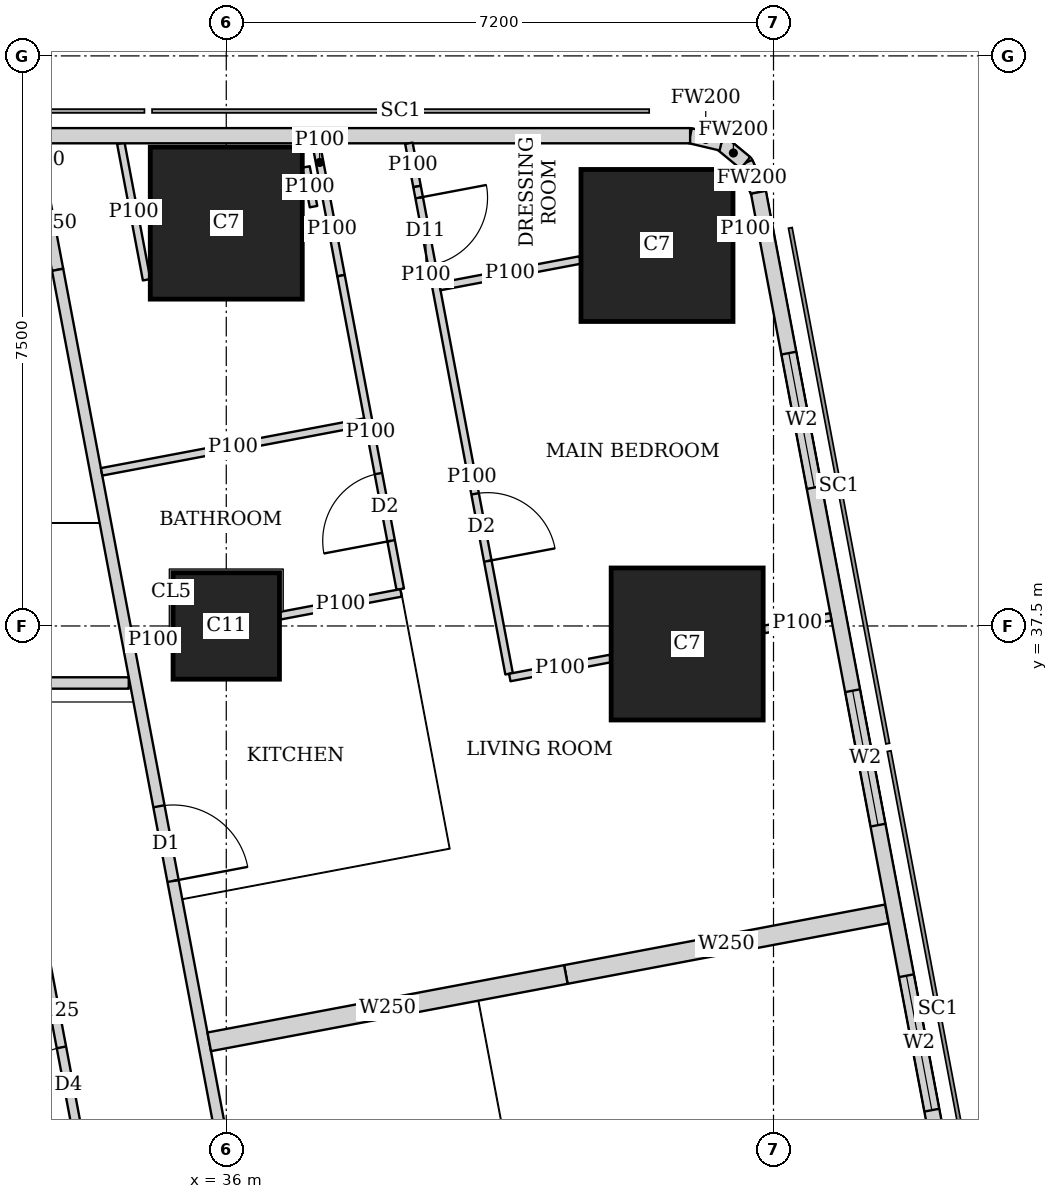
"""IFC4 building model, lengths in metres.
Left out: names, types, materials, properties, quantities, classifications, styles, units other than length and angle.
Written with IfcOpenShell. Run it as: python <this file> out.ifc"""

import sys

from ifc_helpers import new_model, si_unit, direction, frame, frame_2d, origin, origin_2d, place, context, subcontext, project, spatial, rectangle, extrude, element, fill, save


model = new_model("IFC4")
c1 = context("Model", 3, precision=1e-05, world=origin(), true_north=direction((0.0, 1.0)))
c2 = subcontext(c1, "Body", "Model", "MODEL_VIEW")
j1 = project(units=[si_unit("LENGTHUNIT", "METRE"), si_unit("PLANEANGLEUNIT", "RADIAN")], contexts=[c1])
p1 = place(None, origin())
s1 = spatial("IfcSite", under=j1, at=p1, CompositionType="ELEMENT")
p2 = place(p1, origin())
s2 = spatial("IfcBuilding", under=s1, at=p2, CompositionType="ELEMENT")
p3 = place(p2, frame((0.0, 0.0, 255.35)))
s3 = spatial("IfcBuildingStorey", under=s2, at=p3, CompositionType="ELEMENT", Elevation=255.35)
p4 = place(p3, frame((36.0, 37.5, 0.0), z_axis=(0.0, 0.0, 1.0), x_axis=(1.0, 0.0, 0.0)))
e1 = element("IfcColumn", 1, at=p4, inside=s3, PredefinedType="COLUMN", context=c2, shape_type="SweptSolid", body=[
    extrude(rectangle(XDim=1.4, YDim=1.4, at=origin_2d()), origin(), (0.0, 0.0, 1.0), 3.75),
])
for number, where, z_axis, x_axis in (
    (2, (42.064, 37.263, 0.0), (0.0, 0.0, 1.0), (1.0, 0.0, 0.0)),
    (3, (36.0, 42.8, 0.0), (0.0, 0.0, 1.0), (1.0, 0.0, 0.0)),
    (4, (41.667, 42.506, 0.0), (0.0, 0.0, 1.0), (1.0, 0.0, 0.0)),
):
    element("IfcColumn", number, at=place(p3, frame(where, z_axis=z_axis, x_axis=x_axis)), inside=s3, PredefinedType="COLUMN", context=c2, shape_type="SweptSolid", body=[
        extrude(rectangle(XDim=2.0, YDim=2.0, at=origin_2d()), origin(), (0.0, 0.0, 1.0), 3.75),
    ])
p5 = place(p3, frame((49.684, 7.832, 0.0), z_axis=(0.0, 0.0, 1.0), x_axis=(-0.185616669694, 0.982622232565, 0.0)))
e5 = element("IfcWall", 5, at=p5, inside=s3, PredefinedType="SOLIDWALL", context=c2, shape_type="SweptSolid", body=[
    extrude(rectangle(XDim=36.0, YDim=0.2, at=frame_2d((18.0, 0.0))), origin(), (0.0, 0.0, 1.0), 3.5),
])
p6 = place(p5, frame((2.518, 0.0, 0.9)))
e6 = element("IfcOpeningElement", 6, at=p6, cuts=e5, PredefinedType="OPENING", context=c2, shape_type="SweptSolid", body=[
    extrude(rectangle(XDim=2.4, YDim=1.5, at=frame_2d((1.2, 0.75))), frame((0.0, 0.11, 0.0), z_axis=(0.0, -1.0, 0.0), x_axis=(1.0, 0.0, 0.0)), (0.0, 0.0, 1.0), 0.22),
])
p7 = place(p5, frame((8.444, 0.0, 0.9)))
e7 = element("IfcOpeningElement", 7, at=p7, cuts=e5, PredefinedType="OPENING", context=c2, shape_type="SweptSolid", body=[
    extrude(rectangle(XDim=1.8, YDim=1.5, at=frame_2d((0.9, 0.75))), frame((0.0, 0.11, 0.0), z_axis=(0.0, -1.0, 0.0), x_axis=(1.0, 0.0, 0.0)), (0.0, 0.0, 1.0), 0.22),
])
p8 = place(p5, frame((12.261, 0.0, 0.9)))
e8 = element("IfcOpeningElement", 8, at=p8, cuts=e5, PredefinedType="OPENING", context=c2, shape_type="SweptSolid", body=[
    extrude(rectangle(XDim=1.8, YDim=1.5, at=frame_2d((0.9, 0.75))), frame((0.0, 0.11, 0.0), z_axis=(0.0, -1.0, 0.0), x_axis=(1.0, 0.0, 0.0)), (0.0, 0.0, 1.0), 0.22),
])
p9 = place(p5, frame((16.078, 0.0, 0.9)))
e9 = element("IfcOpeningElement", 9, at=p9, cuts=e5, PredefinedType="OPENING", context=c2, shape_type="SweptSolid", body=[
    extrude(rectangle(XDim=1.8, YDim=1.5, at=frame_2d((0.9, 0.75))), frame((0.0, 0.11, 0.0), z_axis=(0.0, -1.0, 0.0), x_axis=(1.0, 0.0, 0.0)), (0.0, 0.0, 1.0), 0.22),
])
p10 = place(p5, frame((19.894, 0.0, 0.9)))
e10 = element("IfcOpeningElement", 10, at=p10, cuts=e5, PredefinedType="OPENING", context=c2, shape_type="SweptSolid", body=[
    extrude(rectangle(XDim=1.8, YDim=1.5, at=frame_2d((0.9, 0.75))), frame((0.0, 0.11, 0.0), z_axis=(0.0, -1.0, 0.0), x_axis=(1.0, 0.0, 0.0)), (0.0, 0.0, 1.0), 0.22),
])
p11 = place(p5, frame((23.71, 0.0, 0.9)))
e11 = element("IfcOpeningElement", 11, at=p11, cuts=e5, PredefinedType="OPENING", context=c2, shape_type="SweptSolid", body=[
    extrude(rectangle(XDim=1.8, YDim=1.5, at=frame_2d((0.9, 0.75))), frame((0.0, 0.11, 0.0), z_axis=(0.0, -1.0, 0.0), x_axis=(1.0, 0.0, 0.0)), (0.0, 0.0, 1.0), 0.22),
])
p12 = place(p5, frame((27.526, 0.0, 0.9)))
e12 = element("IfcOpeningElement", 12, at=p12, cuts=e5, PredefinedType="OPENING", context=c2, shape_type="SweptSolid", body=[
    extrude(rectangle(XDim=1.8, YDim=1.5, at=frame_2d((0.9, 0.75))), frame((0.0, 0.11, 0.0), z_axis=(0.0, -1.0, 0.0), x_axis=(1.0, 0.0, 0.0)), (0.0, 0.0, 1.0), 0.22),
])
p13 = place(p5, frame((32.046, 0.0, 0.9)))
e13 = element("IfcOpeningElement", 13, at=p13, cuts=e5, PredefinedType="OPENING", context=c2, shape_type="SweptSolid", body=[
    extrude(rectangle(XDim=1.8, YDim=1.5, at=frame_2d((0.9, 0.75))), frame((0.0, 0.11, 0.0), z_axis=(0.0, -1.0, 0.0), x_axis=(1.0, 0.0, 0.0)), (0.0, 0.0, 1.0), 0.22),
])
p14 = place(p3, frame((43.002, 43.206, 0.0), z_axis=(0.0, 0.0, 1.0), x_axis=(-0.40678170573, 0.913525393124, 0.0)))
e14 = element("IfcWall", 14, at=p14, inside=s3, PredefinedType="SOLIDWALL", context=c2, shape_type="SweptSolid", body=[
    extrude(rectangle(XDim=0.423, YDim=0.2, at=frame_2d((0.211, 0.0))), origin(), (0.0, 0.0, 1.0), 3.5),
])
p15 = place(p3, frame((42.83, 43.592, 0.0), z_axis=(0.0, 0.0, 1.0), x_axis=(-0.771190539797, 0.636604391539, 0.0)))
e15 = element("IfcWall", 15, at=p15, inside=s3, PredefinedType="SOLIDWALL", context=c2, shape_type="SweptSolid", body=[
    extrude(rectangle(XDim=0.41, YDim=0.2, at=frame_2d((0.205, 0.0))), origin(), (0.0, 0.0, 1.0), 3.5),
])
p16 = place(p3, frame((42.514, 43.853, 0.0), z_axis=(0.0, 0.0, 1.0), x_axis=(-0.973288080424, 0.229587265555, 0.0)))
e16 = element("IfcWall", 16, at=p16, inside=s3, PredefinedType="SOLIDWALL", context=c2, shape_type="SweptSolid", body=[
    extrude(rectangle(XDim=0.422, YDim=0.2, at=frame_2d((0.211, 0.0))), origin(), (0.0, 0.0, 1.0), 3.5),
])
p17 = place(p3, frame((42.103, 43.95, 0.0), z_axis=(0.0, 0.0, 1.0), x_axis=(-1.0, 0.0, 0.0)))
e17 = element("IfcWall", 17, at=p17, inside=s3, PredefinedType="SOLIDWALL", context=c2, shape_type="SweptSolid", body=[
    extrude(rectangle(XDim=27.54, YDim=0.2, at=frame_2d((13.77, 0.0))), origin(), (0.0, 0.0, 1.0), 3.5),
])
p18 = place(p17, frame((10.603, 0.0, 0.9)))
e18 = element("IfcOpeningElement", 18, at=p18, cuts=e17, PredefinedType="OPENING", context=c2, shape_type="SweptSolid", body=[
    extrude(rectangle(XDim=1.8, YDim=1.5, at=frame_2d((0.9, 0.75))), frame((0.0, 0.11, 0.0), z_axis=(0.0, -1.0, 0.0), x_axis=(1.0, 0.0, 0.0)), (0.0, 0.0, 1.0), 0.22),
])
p19 = place(p17, frame((14.203, 0.0, 0.9)))
e19 = element("IfcOpeningElement", 19, at=p19, cuts=e17, PredefinedType="OPENING", context=c2, shape_type="SweptSolid", body=[
    extrude(rectangle(XDim=1.8, YDim=1.5, at=frame_2d((0.9, 0.75))), frame((0.0, 0.11, 0.0), z_axis=(0.0, -1.0, 0.0), x_axis=(1.0, 0.0, 0.0)), (0.0, 0.0, 1.0), 0.22),
])
p20 = place(p17, frame((17.803, 0.0, 0.9)))
e20 = element("IfcOpeningElement", 20, at=p20, cuts=e17, PredefinedType="OPENING", context=c2, shape_type="SweptSolid", body=[
    extrude(rectangle(XDim=1.8, YDim=1.5, at=frame_2d((0.9, 0.75))), frame((0.0, 0.11, 0.0), z_axis=(0.0, -1.0, 0.0), x_axis=(1.0, 0.0, 0.0)), (0.0, 0.0, 1.0), 0.22),
])
p21 = place(p17, frame((22.822, 0.0, 0.9)))
e21 = element("IfcOpeningElement", 21, at=p21, cuts=e17, PredefinedType="OPENING", context=c2, shape_type="SweptSolid", body=[
    extrude(rectangle(XDim=2.4, YDim=1.5, at=frame_2d((1.2, 0.75))), frame((0.0, 0.11, 0.0), z_axis=(0.0, -1.0, 0.0), x_axis=(1.0, 0.0, 0.0)), (0.0, 0.0, 1.0), 0.22),
])
p22 = place(p3, frame((29.501, 36.75, 0.0), z_axis=(0.0, 0.0, 1.0), x_axis=(1.0, 0.0, 0.0)))
e22 = element("IfcWall", 22, at=p22, inside=s3, PredefinedType="SOLIDWALL", context=c2, shape_type="SweptSolid", body=[
    extrude(rectangle(XDim=5.216, YDim=0.15, at=frame_2d((2.608, 0.0))), origin(), (0.0, 0.0, 1.0), 3.5),
])
p23 = place(p22, frame((1.803, 0.0, 0.0)))
e23 = element("IfcOpeningElement", 23, at=p23, cuts=e22, PredefinedType="OPENING", context=c2, shape_type="SweptSolid", body=[
    extrude(rectangle(XDim=1.0, YDim=2.1, at=frame_2d((0.5, 1.05))), frame((0.0, 0.085, 0.0), z_axis=(0.0, -1.0, 0.0), x_axis=(1.0, 0.0, 0.0)), (0.0, 0.0, 1.0), 0.17),
])
p24 = place(p3, frame((33.549, 43.414, 0.0), z_axis=(0.0, 0.0, 1.0), x_axis=(0.185585816539, -0.982628060204, 0.0)))
e24 = element("IfcWall", 24, at=p24, inside=s3, PredefinedType="SOLIDWALL", context=c2, shape_type="SweptSolid", body=[
    extrude(rectangle(XDim=1.25, YDim=0.15, at=frame_2d((0.625, 0.0))), origin(), (0.0, 0.0, 1.0), 2.05),
])
p25 = place(p3, frame((33.781, 42.186, 0.0), z_axis=(0.0, 0.0, 1.0), x_axis=(0.185593518645, -0.9826266055, 0.0)))
e25 = element("IfcWall", 25, at=p25, inside=s3, PredefinedType="SOLIDWALL", context=c2, shape_type="SweptSolid", body=[
    extrude(rectangle(XDim=35.961, YDim=0.15, at=frame_2d((17.98, 0.0))), origin(), (0.0, 0.0, 1.0), 2.5),
])
p26 = place(p25, frame((7.183, 0.0, 0.0)))
e26 = element("IfcOpeningElement", 26, at=p26, cuts=e25, PredefinedType="OPENING", context=c2, shape_type="SweptSolid", body=[
    extrude(rectangle(XDim=1.0, YDim=2.1, at=frame_2d((0.5, 1.05))), frame((0.0, 0.085, 0.0), z_axis=(0.0, -1.0, 0.0), x_axis=(1.0, 0.0, 0.0)), (0.0, 0.0, 1.0), 0.17),
])
p27 = place(p25, frame((11.76, 0.0, 0.0)))
e27 = element("IfcOpeningElement", 27, at=p27, cuts=e25, PredefinedType="OPENING", context=c2, shape_type="SweptSolid", body=[
    extrude(rectangle(XDim=1.0, YDim=2.1, at=frame_2d((0.5, 1.05))), frame((0.0, 0.085, 0.0), z_axis=(0.0, -1.0, 0.0), x_axis=(1.0, 0.0, 0.0)), (0.0, 0.0, 1.0), 0.17),
])
p28 = place(p25, frame((23.863, 0.0, 0.0)))
e28 = element("IfcOpeningElement", 28, at=p28, cuts=e25, PredefinedType="OPENING", context=c2, shape_type="SweptSolid", body=[
    extrude(rectangle(XDim=1.0, YDim=2.1, at=frame_2d((0.5, 1.05))), frame((0.0, 0.085, 0.0), z_axis=(0.0, -1.0, 0.0), x_axis=(1.0, 0.0, 0.0)), (0.0, 0.0, 1.0), 0.17),
])
p29 = place(p25, frame((30.502, 0.0, 0.0)))
e29 = element("IfcOpeningElement", 29, at=p29, cuts=e25, PredefinedType="OPENING", context=c2, shape_type="SweptSolid", body=[
    extrude(rectangle(XDim=1.0, YDim=2.1, at=frame_2d((0.5, 1.05))), frame((0.0, 0.085, 0.0), z_axis=(0.0, -1.0, 0.0), x_axis=(1.0, 0.0, 0.0)), (0.0, 0.0, 1.0), 0.17),
])
p30 = place(p3, frame((34.952, 42.055, 0.0), z_axis=(0.0, 0.0, 1.0), x_axis=(-0.185490642006, 0.98264603074, 0.0)))
e30 = element("IfcWall", 30, at=p30, inside=s3, PredefinedType="PARTITIONING", context=c2, shape_type="SweptSolid", body=[
    extrude(rectangle(XDim=1.827, YDim=0.1, at=frame_2d((0.914, 0.0))), origin(), (0.0, 0.0, 1.0), 2.05),
])
p31 = place(p3, frame((37.049, 43.539, 0.0), z_axis=(0.0, 0.0, 1.0), x_axis=(0.186119495745, -0.982527115811, 0.0)))
e31 = element("IfcWall", 31, at=p31, inside=s3, PredefinedType="PARTITIONING", context=c2, shape_type="SweptSolid", body=[
    extrude(rectangle(XDim=0.531, YDim=0.1, at=frame_2d((0.266, 0.0))), origin(), (0.0, 0.0, 1.0), 2.05),
])
p32 = place(p3, frame((38.403, 43.85, 0.0), z_axis=(0.0, 0.0, 1.0), x_axis=(0.184976954078, -0.982742858768, 0.0)))
e32 = element("IfcWall", 32, at=p32, inside=s3, PredefinedType="PARTITIONING", context=c2, shape_type="SweptSolid", body=[
    extrude(rectangle(XDim=0.578, YDim=0.1, at=frame_2d((0.289, 0.0))), origin(), (0.0, 0.0, 1.0), 3.5),
])
p33 = place(p3, frame((38.51, 43.282, 0.0), z_axis=(0.0, 0.0, 1.0), x_axis=(0.185775287495, -0.982592256511, 0.0)))
e33 = element("IfcWall", 33, at=p33, inside=s3, PredefinedType="PARTITIONING", context=c2, shape_type="SweptSolid", body=[
    extrude(rectangle(XDim=1.259, YDim=0.1, at=frame_2d((0.629, 0.0))), origin(), (0.0, 0.0, 1.0), 2.05),
])
p34 = place(p33, frame((0.15, 0.0, 0.0)))
e34 = element("IfcOpeningElement", 34, at=p34, cuts=e33, PredefinedType="OPENING", context=c2, shape_type="SweptSolid", body=[
    extrude(rectangle(XDim=0.9, YDim=2.0, at=frame_2d((0.45, 1.0))), frame((0.0, 0.06, 0.0), z_axis=(0.0, -1.0, 0.0), x_axis=(1.0, 0.0, 0.0)), (0.0, 0.0, 1.0), 0.12),
])
p35 = place(p3, frame((38.744, 42.045, 0.0), z_axis=(0.0, 0.0, 1.0), x_axis=(0.185564988614, -0.982631993679, 0.0)))
e35 = element("IfcWall", 35, at=p35, inside=s3, PredefinedType="PARTITIONING", context=c2, shape_type="SweptSolid", body=[
    extrude(rectangle(XDim=5.265, YDim=0.1, at=frame_2d((2.633, 0.0))), origin(), (0.0, 0.0, 1.0), 3.5),
])
p36 = place(p35, frame((2.856, 0.0, 0.0)))
e36 = element("IfcOpeningElement", 36, at=p36, cuts=e35, PredefinedType="OPENING", context=c2, shape_type="SweptSolid", body=[
    extrude(rectangle(XDim=0.9, YDim=2.1, at=frame_2d((0.45, 1.05))), frame((0.0, 0.06, 0.0), z_axis=(0.0, -1.0, 0.0), x_axis=(1.0, 0.0, 0.0)), (0.0, 0.0, 1.0), 0.12),
])
p37 = place(p3, frame((37.181, 43.85, 0.0), z_axis=(0.0, 0.0, 1.0), x_axis=(0.185121727606, -0.982715597703, 0.0)))
e37 = element("IfcWall", 37, at=p37, inside=s3, PredefinedType="PARTITIONING", context=c2, shape_type="SweptSolid", body=[
    extrude(rectangle(XDim=0.513, YDim=0.1, at=frame_2d((0.256, 0.0))), origin(), (0.0, 0.0, 1.0), 3.5),
])
p38 = place(p3, frame((37.276, 43.346, 0.0), z_axis=(0.0, 0.0, 1.0), x_axis=(0.185962504646, -0.982556841544, 0.0)))
e38 = element("IfcWall", 38, at=p38, inside=s3, PredefinedType="PARTITIONING", context=c2, shape_type="SweptSolid", body=[
    extrude(rectangle(XDim=1.259, YDim=0.1, at=frame_2d((0.629, 0.0))), origin(), (0.0, 0.0, 1.0), 2.05),
])
p39 = place(p3, frame((37.51, 42.109, 0.0), z_axis=(0.0, 0.0, 1.0), x_axis=(0.185580569503, -0.98262905118, 0.0)))
e39 = element("IfcWall", 39, at=p39, inside=s3, PredefinedType="PARTITIONING", context=c2, shape_type="SweptSolid", body=[
    extrude(rectangle(XDim=4.198, YDim=0.1, at=frame_2d((2.099, 0.0))), origin(), (0.0, 0.0, 1.0), 3.5),
])
p40 = place(p39, frame((2.65, 0.0, 0.0)))
e40 = element("IfcOpeningElement", 40, at=p40, cuts=e39, PredefinedType="OPENING", context=c2, shape_type="SweptSolid", body=[
    extrude(rectangle(XDim=0.9, YDim=2.1, at=frame_2d((0.45, 1.05))), frame((0.0, 0.06, 0.0), z_axis=(0.0, -1.0, 0.0), x_axis=(1.0, 0.0, 0.0)), (0.0, 0.0, 1.0), 0.12),
])
p41 = place(p3, frame((42.985, 42.755, 0.0), z_axis=(0.0, 0.0, 1.0), x_axis=(-0.98281924824, -0.184570651215, 0.0)))
e41 = element("IfcWall", 41, at=p41, inside=s3, PredefinedType="PARTITIONING", context=c2, shape_type="SweptSolid", body=[
    extrude(rectangle(XDim=0.313, YDim=0.1, at=frame_2d((0.157, 0.0))), origin(), (0.0, 0.0, 1.0), 3.5),
])
p42 = place(p3, frame((40.657, 42.315, 0.0), z_axis=(0.0, 0.0, 1.0), x_axis=(-0.982622785543, -0.185613742305, 0.0)))
e42 = element("IfcWall", 42, at=p42, inside=s3, PredefinedType="PARTITIONING", context=c2, shape_type="SweptSolid", body=[
    extrude(rectangle(XDim=1.88, YDim=0.1, at=frame_2d((0.94, 0.0))), origin(), (0.0, 0.0, 1.0), 2.05),
])
p43 = place(p3, frame((43.955, 37.62, 0.0), z_axis=(0.0, 0.0, 1.0), x_axis=(-0.982708424405, -0.18515980288, 0.0)))
e43 = element("IfcWall", 43, at=p43, inside=s3, PredefinedType="PARTITIONING", context=c2, shape_type="SweptSolid", body=[
    extrude(rectangle(XDim=0.897, YDim=0.1, at=frame_2d((0.448, 0.0))), origin(), (0.0, 0.0, 1.0), 3.5),
])
p44 = place(p3, frame((41.054, 37.072, 0.0), z_axis=(0.0, 0.0, 1.0), x_axis=(-0.982635482721, -0.18554651195, 0.0)))
e44 = element("IfcWall", 44, at=p44, inside=s3, PredefinedType="PARTITIONING", context=c2, shape_type="SweptSolid", body=[
    extrude(rectangle(XDim=1.347, YDim=0.1, at=frame_2d((0.674, 0.0))), origin(), (0.0, 0.0, 1.0), 3.5),
])
p45 = place(p3, frame((37.823, 40.182, 0.0), z_axis=(0.0, 0.0, 1.0), x_axis=(-0.98263926043, -0.185526504472, 0.0)))
e45 = element("IfcWall", 45, at=p45, inside=s3, PredefinedType="PARTITIONING", context=c2, shape_type="SweptSolid", body=[
    extrude(rectangle(XDim=3.524, YDim=0.1, at=frame_2d((1.762, 0.0))), origin(), (0.0, 0.0, 1.0), 3.5),
])
p46 = place(p3, frame((38.299, 37.935, 0.0), z_axis=(0.0, 0.0, 1.0), x_axis=(-0.98263725405, -0.185537130931, 0.0)))
e46 = element("IfcWall", 46, at=p46, inside=s3, PredefinedType="PARTITIONING", context=c2, shape_type="SweptSolid", body=[
    extrude(rectangle(XDim=1.617, YDim=0.1, at=frame_2d((0.809, 0.0))), origin(), (0.0, 0.0, 1.0), 3.5),
])
p47 = place(p3, frame((35.29, 37.366, 0.0), z_axis=(0.0, 0.0, 1.0), x_axis=(-0.982715597703, -0.185121727606, 0.0)))
e47 = element("IfcWall", 47, at=p47, inside=s3, PredefinedType="PARTITIONING", context=c2, shape_type="SweptSolid", body=[
    extrude(rectangle(XDim=0.513, YDim=0.1, at=frame_2d((0.256, 0.0))), origin(), (0.0, 0.0, 1.0), 3.5),
])
p48 = place(p3, frame((44.693, 33.713, 0.0), z_axis=(0.0, 0.0, 1.0), x_axis=(-0.982633535512, -0.185556823879, 0.0)))
e48 = element("IfcWall", 48, at=p48, inside=s3, PredefinedType="SOLIDWALL", context=c2, shape_type="SweptSolid", body=[
    extrude(rectangle(XDim=4.3, YDim=0.25, at=frame_2d((2.15, 0.0))), origin(), (0.0, 0.0, 1.0), 2.5),
])
p49 = place(p3, frame((40.468, 32.915, 0.0), z_axis=(0.0, 0.0, 1.0), x_axis=(-0.982635807605, -0.185544791394, 0.0)))
e49 = element("IfcWall", 49, at=p49, inside=s3, PredefinedType="SOLIDWALL", context=c2, shape_type="SweptSolid", body=[
    extrude(rectangle(XDim=4.775, YDim=0.25, at=frame_2d((2.388, 0.0))), origin(), (0.0, 0.0, 1.0), 3.5),
])
p50 = place(p3, frame((34.193, 30.04, 0.0), z_axis=(0.0, 0.0, 1.0), x_axis=(-0.185556349615, 0.98263362507, 0.0)))
e50 = element("IfcWall", 50, at=p50, inside=s3, PredefinedType="PARTITIONING", context=c2, shape_type="SweptSolid", body=[
    extrude(rectangle(XDim=4.883, YDim=0.125, at=frame_2d((2.441, 0.0))), origin(), (0.0, 0.0, 1.0), 2.5),
])
p51 = place(p50, frame((0.95, 0.0, 0.0)))
e51 = element("IfcOpeningElement", 51, at=p51, cuts=e50, PredefinedType="OPENING", context=c2, shape_type="SweptSolid", body=[
    extrude(rectangle(XDim=1.0, YDim=2.1, at=frame_2d((0.5, 1.05))), frame((0.0, 0.073, 0.0), z_axis=(0.0, -1.0, 0.0), x_axis=(1.0, 0.0, 0.0)), (0.0, 0.0, 1.0), 0.145),
])
p52 = place(p11, origin())
e52 = element("IfcWindow", 52, at=p52, inside=s3, PartitioningType="SINGLE_PANEL", PredefinedType="WINDOW", context=c2, shape_type="SweptSolid", body=[
    extrude(rectangle(XDim=1.8, YDim=1.5, at=frame_2d((0.9, 0.75))), frame((0.0, 0.03, 0.0), z_axis=(0.0, -1.0, 0.0), x_axis=(1.0, 0.0, 0.0)), (0.0, 0.0, 1.0), 0.06),
])
fill(e11, e52)
p53 = place(p12, origin())
e53 = element("IfcWindow", 53, at=p53, inside=s3, PartitioningType="SINGLE_PANEL", PredefinedType="WINDOW", context=c2, shape_type="SweptSolid", body=[
    extrude(rectangle(XDim=1.8, YDim=1.5, at=frame_2d((0.9, 0.75))), frame((0.0, 0.03, 0.0), z_axis=(0.0, -1.0, 0.0), x_axis=(1.0, 0.0, 0.0)), (0.0, 0.0, 1.0), 0.06),
])
fill(e12, e53)
p54 = place(p13, origin())
e54 = element("IfcWindow", 54, at=p54, inside=s3, PartitioningType="SINGLE_PANEL", PredefinedType="WINDOW", context=c2, shape_type="SweptSolid", body=[
    extrude(rectangle(XDim=1.8, YDim=1.5, at=frame_2d((0.9, 0.75))), frame((0.0, 0.03, 0.0), z_axis=(0.0, -1.0, 0.0), x_axis=(1.0, 0.0, 0.0)), (0.0, 0.0, 1.0), 0.06),
])
fill(e13, e54)
p55 = place(p34, origin())
e55 = element("IfcDoor", 55, at=p55, inside=s3, OperationType="SINGLE_SWING_LEFT", PredefinedType="DOOR", context=c2, shape_type="SweptSolid", body=[
    extrude(rectangle(XDim=0.9, YDim=2.0, at=frame_2d((0.45, 1.0))), frame((0.0, 0.025, 0.0), z_axis=(0.0, -1.0, 0.0), x_axis=(1.0, 0.0, 0.0)), (0.0, 0.0, 1.0), 0.05),
])
fill(e34, e55)
p56 = place(p36, origin())
e56 = element("IfcDoor", 56, at=p56, inside=s3, OperationType="SINGLE_SWING_RIGHT", PredefinedType="DOOR", context=c2, shape_type="SweptSolid", body=[
    extrude(rectangle(XDim=0.9, YDim=2.1, at=frame_2d((0.45, 1.05))), frame((0.0, 0.025, 0.0), z_axis=(0.0, -1.0, 0.0), x_axis=(1.0, 0.0, 0.0)), (0.0, 0.0, 1.0), 0.05),
])
fill(e36, e56)
p57 = place(p40, origin())
e57 = element("IfcDoor", 57, at=p57, inside=s3, OperationType="SINGLE_SWING_LEFT", PredefinedType="DOOR", context=c2, shape_type="SweptSolid", body=[
    extrude(rectangle(XDim=0.9, YDim=2.1, at=frame_2d((0.45, 1.05))), frame((0.0, 0.025, 0.0), z_axis=(0.0, -1.0, 0.0), x_axis=(1.0, 0.0, 0.0)), (0.0, 0.0, 1.0), 0.05),
])
fill(e40, e57)
p58 = place(p26, origin())
e58 = element("IfcDoor", 58, at=p58, inside=s3, OperationType="SINGLE_SWING_RIGHT", PredefinedType="DOOR", context=c2, shape_type="SweptSolid", body=[
    extrude(rectangle(XDim=1.0, YDim=2.1, at=frame_2d((0.5, 1.05))), frame((0.0, 0.025, 0.0), z_axis=(0.0, -1.0, 0.0), x_axis=(1.0, 0.0, 0.0)), (0.0, 0.0, 1.0), 0.05),
])
fill(e26, e58)
p59 = place(p51, origin())
e59 = element("IfcDoor", 59, at=p59, inside=s3, OperationType="SINGLE_SWING_LEFT", PredefinedType="DOOR", context=c2, shape_type="SweptSolid", body=[
    extrude(rectangle(XDim=1.0, YDim=2.1, at=frame_2d((0.5, 1.05))), frame((0.0, 0.025, 0.0), z_axis=(0.0, -1.0, 0.0), x_axis=(1.0, 0.0, 0.0)), (0.0, 0.0, 1.0), 0.05),
])
fill(e51, e59)
save(model, sys.argv[1])
